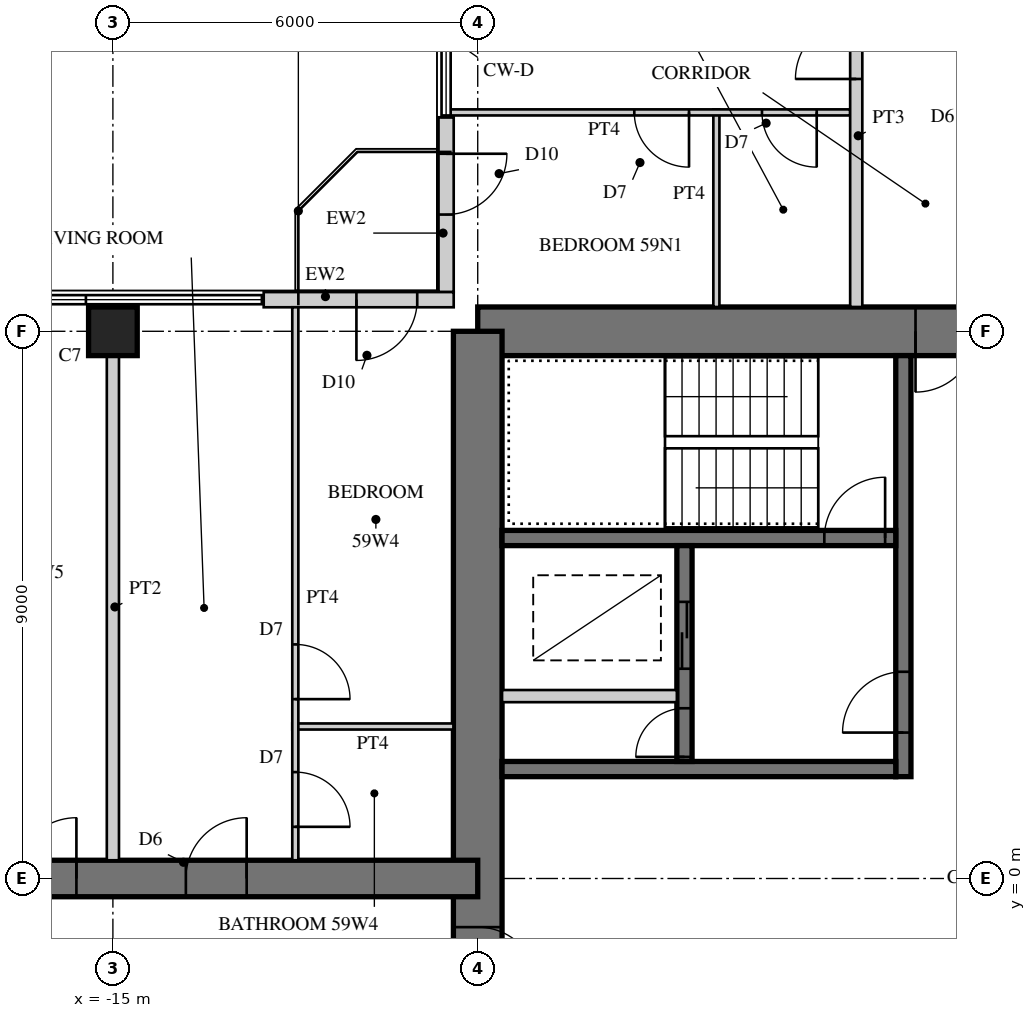
"""IFC4 building model, lengths in metres.
Left out: names, types, materials, properties, quantities, classifications, styles, units other than length and angle.
Written with IfcOpenShell. Run it as: python <this file> out.ifc"""

import sys

from ifc_helpers import new_model, si_unit, direction, frame, frame_2d, origin, origin_2d, place, context, subcontext, project, spatial, rectangle, hollow_rectangle, extrude, element, fill, save


model = new_model("IFC4")
c1 = context("Model", 3, precision=1e-05, world=origin(), true_north=direction((0.0, 1.0)))
c2 = subcontext(c1, "Body", "Model", "MODEL_VIEW")
j1 = project(units=[si_unit("LENGTHUNIT", "METRE"), si_unit("PLANEANGLEUNIT", "RADIAN")], contexts=[c1])
p1 = place(None, origin())
s1 = spatial("IfcSite", under=j1, at=p1, CompositionType="ELEMENT")
p2 = place(p1, origin())
s2 = spatial("IfcBuilding", under=s1, at=p2, CompositionType="ELEMENT")
p3 = place(p2, frame((0.0, 0.0, 232.3)))
s3 = spatial("IfcBuildingStorey", under=s2, at=p3, CompositionType="ELEMENT", Elevation=232.3)
p4 = place(p3, frame((9.0, 9.0, 0.0), z_axis=(0.0, 0.0, 1.0), x_axis=(-1.0, 0.0, 0.0)))
e1 = element("IfcWall", 1, at=p4, inside=s3, PredefinedType="SHEAR", context=c2, shape_type="SweptSolid", body=[
    extrude(rectangle(XDim=18.0, YDim=0.8, at=frame_2d((9.0, 0.0))), origin(), (0.0, 0.0, 1.0), 3.4),
])
p5 = place(p4, frame((9.8, 0.0, 0.0)))
e2 = element("IfcOpeningElement", 2, at=p5, cuts=e1, PredefinedType="OPENING", context=c2, shape_type="SweptSolid", body=[
    extrude(rectangle(XDim=1.0, YDim=2.4, at=frame_2d((0.5, 1.2))), frame((0.0, 0.41, 0.0), z_axis=(0.0, -1.0, 0.0), x_axis=(1.0, 0.0, 0.0)), (0.0, 0.0, 1.0), 0.82),
])
p6 = place(p3, frame((-9.0, 9.0, 0.0), z_axis=(0.0, 0.0, 1.0), x_axis=(0.0, -1.0, 0.0)))
e3 = element("IfcWall", 3, at=p6, inside=s3, PredefinedType="SHEAR", context=c2, shape_type="SweptSolid", body=[
    extrude(rectangle(XDim=18.0, YDim=0.8, at=frame_2d((9.0, 0.0))), origin(), (0.0, 0.0, 1.0), 3.4),
])
p7 = place(p6, frame((9.8, 0.0, 0.0)))
e4 = element("IfcOpeningElement", 4, at=p7, cuts=e3, PredefinedType="OPENING", context=c2, shape_type="SweptSolid", body=[
    extrude(rectangle(XDim=1.0, YDim=2.4, at=frame_2d((0.5, 1.2))), frame((0.0, 0.41, 0.0), z_axis=(0.0, -1.0, 0.0), x_axis=(1.0, 0.0, 0.0)), (0.0, 0.0, 1.0), 0.82),
])
p8 = place(p3, frame((-2.0, 1.675, 0.0), z_axis=(0.0, 0.0, 1.0), x_axis=(0.0, 1.0, 0.0)))
e5 = element("IfcWall", 5, at=p8, inside=s3, PredefinedType="SHEAR", context=c2, shape_type="SweptSolid", body=[
    extrude(rectangle(XDim=6.925, YDim=0.25, at=frame_2d((3.462, 0.0))), origin(), (0.0, 0.0, 1.0), 3.4),
])
p9 = place(p8, frame((0.725, 0.0, 0.0)))
e6 = element("IfcOpeningElement", 6, at=p9, cuts=e5, PredefinedType="OPENING", context=c2, shape_type="SweptSolid", body=[
    extrude(rectangle(XDim=1.0, YDim=2.1, at=frame_2d((0.5, 1.05))), frame((0.0, 0.135, 0.0), z_axis=(0.0, -1.0, 0.0), x_axis=(1.0, 0.0, 0.0)), (0.0, 0.0, 1.0), 0.27),
])
p10 = place(p3, frame((-2.125, 1.8, 0.0), z_axis=(0.0, 0.0, 1.0), x_axis=(-1.0, 0.0, 0.0)))
e7 = element("IfcWall", 7, at=p10, inside=s3, PredefinedType="SHEAR", context=c2, shape_type="SweptSolid", body=[
    extrude(rectangle(XDim=6.475, YDim=0.25, at=frame_2d((3.238, 0.0))), origin(), (0.0, 0.0, 1.0), 3.4),
])
p11 = place(p3, frame((-2.125, 5.6, 0.0), z_axis=(0.0, 0.0, 1.0), x_axis=(-1.0, 0.0, 0.0)))
e8 = element("IfcWall", 8, at=p11, inside=s3, PredefinedType="SHEAR", context=c2, shape_type="SweptSolid", body=[
    extrude(rectangle(XDim=6.475, YDim=0.25, at=frame_2d((3.238, 0.0))), origin(), (0.0, 0.0, 1.0), 3.4),
])
p12 = place(p11, frame((0.175, 0.0, 0.0)))
e9 = element("IfcOpeningElement", 9, at=p12, cuts=e8, PredefinedType="OPENING", context=c2, shape_type="SweptSolid", body=[
    extrude(rectangle(XDim=1.0, YDim=2.1, at=frame_2d((0.5, 1.05))), frame((0.0, 0.135, 0.0), z_axis=(0.0, -1.0, 0.0), x_axis=(1.0, 0.0, 0.0)), (0.0, 0.0, 1.0), 0.27),
])
p13 = place(p3, frame((-5.6, 1.925, 0.0), z_axis=(0.0, 0.0, 1.0), x_axis=(0.0, 1.0, 0.0)))
e10 = element("IfcWall", 10, at=p13, inside=s3, PredefinedType="SHEAR", context=c2, shape_type="SweptSolid", body=[
    extrude(rectangle(XDim=3.55, YDim=0.25, at=frame_2d((1.775, 0.0))), origin(), (0.0, 0.0, 1.0), 3.4),
])
p14 = place(p13, frame((1.525, 0.0, 0.0)))
e11 = element("IfcOpeningElement", 11, at=p14, cuts=e10, PredefinedType="OPENING", context=c2, shape_type="SweptSolid", body=[
    extrude(rectangle(XDim=1.1, YDim=2.2, at=frame_2d((0.55, 1.1))), frame((0.0, 0.135, 0.0), z_axis=(0.0, -1.0, 0.0), x_axis=(1.0, 0.0, 0.0)), (0.0, 0.0, 1.0), 0.27),
])
p15 = place(p13, frame((0.075, 0.0, 0.0)))
e12 = element("IfcOpeningElement", 12, at=p15, cuts=e10, PredefinedType="OPENING", context=c2, shape_type="SweptSolid", body=[
    extrude(rectangle(XDim=0.8, YDim=2.1, at=frame_2d((0.4, 1.05))), frame((0.0, 0.135, 0.0), z_axis=(0.0, -1.0, 0.0), x_axis=(1.0, 0.0, 0.0)), (0.0, 0.0, 1.0), 0.27),
])
p16 = place(p3, frame((-5.725, 3.0, 0.0), z_axis=(0.0, 0.0, 1.0), x_axis=(-1.0, 0.0, 0.0)))
e13 = element("IfcWall", 13, at=p16, inside=s3, PredefinedType="PARTITIONING", context=c2, shape_type="SweptSolid", body=[
    extrude(rectangle(XDim=2.875, YDim=0.2, at=frame_2d((1.438, 0.0))), origin(), (0.0, 0.0, 1.0), 3.4),
])
p17 = place(p3, frame((-9.0, 0.0, 0.0), z_axis=(0.0, 0.0, 1.0), x_axis=(-1.0, 0.0, 0.0)))
e14 = element("IfcWall", 14, at=p17, inside=s3, PredefinedType="SHEAR", context=c2, shape_type="SweptSolid", body=[
    extrude(rectangle(XDim=18.0, YDim=0.6, at=frame_2d((9.0, 0.0))), origin(), (0.0, 0.0, 1.0), 3.4),
])
p18 = place(p17, frame((3.8, 0.0, 0.0)))
e15 = element("IfcOpeningElement", 15, at=p18, cuts=e14, PredefinedType="OPENING", context=c2, shape_type="SweptSolid", body=[
    extrude(rectangle(XDim=1.0, YDim=2.15, at=frame_2d((0.5, 1.075))), frame((0.0, 0.31, 0.0), z_axis=(0.0, -1.0, 0.0), x_axis=(1.0, 0.0, 0.0)), (0.0, 0.0, 1.0), 0.62),
])
p19 = place(p17, frame((6.6, 0.0, 0.0)))
e16 = element("IfcOpeningElement", 16, at=p19, cuts=e14, PredefinedType="OPENING", context=c2, shape_type="SweptSolid", body=[
    extrude(rectangle(XDim=1.0, YDim=2.15, at=frame_2d((0.5, 1.075))), frame((0.0, 0.31, 0.0), z_axis=(0.0, -1.0, 0.0), x_axis=(1.0, 0.0, 0.0)), (0.0, 0.0, 1.0), 0.62),
])
p20 = place(p17, frame((13.3, 0.0, 0.0)))
e17 = element("IfcOpeningElement", 17, at=p20, cuts=e14, PredefinedType="OPENING", context=c2, shape_type="SweptSolid", body=[
    extrude(rectangle(XDim=1.0, YDim=2.2, at=frame_2d((0.5, 1.1))), frame((0.0, 0.31, 0.0), z_axis=(0.0, -1.0, 0.0), x_axis=(1.0, 0.0, 0.0)), (0.0, 0.0, 1.0), 0.62),
])
p21 = place(p3, frame((-15.0, 9.0, 0.0), z_axis=(0.0, 0.0, 1.0), x_axis=(1.0, 0.0, 0.0)))
e18 = element("IfcColumn", 18, at=p21, inside=s3, PredefinedType="COLUMN", context=c2, shape_type="SweptSolid", body=[
    extrude(rectangle(XDim=0.8, YDim=0.8, at=origin_2d()), origin(), (0.0, 0.0, 1.0), 3.4),
])
p22 = place(p3, frame((-9.52, 12.52, 0.0), z_axis=(0.0, 0.0, 1.0), x_axis=(0.0, -1.0, 0.0)))
e19 = element("IfcWall", 19, at=p22, inside=s3, PredefinedType="SOLIDWALL", context=c2, shape_type="SweptSolid", body=[
    extrude(rectangle(XDim=2.875, YDim=0.25, at=frame_2d((1.438, 0.0))), origin(), (0.0, 0.0, 1.0), 3.22),
])
p23 = place(p22, frame((0.6, 0.0, 0.0)))
e20 = element("IfcOpeningElement", 20, at=p23, cuts=e19, PredefinedType="OPENING", context=c2, shape_type="SweptSolid", body=[
    extrude(rectangle(XDim=1.0, YDim=2.2, at=frame_2d((0.5, 1.1))), frame((0.0, 0.135, 0.0), z_axis=(0.0, -1.0, 0.0), x_axis=(1.0, 0.0, 0.0)), (0.0, 0.0, 1.0), 0.27),
])
p24 = place(p3, frame((-9.395, 9.52, 0.0), z_axis=(0.0, 0.0, 1.0), x_axis=(-1.0, 0.0, 0.0)))
e21 = element("IfcWall", 21, at=p24, inside=s3, PredefinedType="SOLIDWALL", context=c2, shape_type="SweptSolid", body=[
    extrude(rectangle(XDim=3.125, YDim=0.25, at=frame_2d((1.562, 0.0))), origin(), (0.0, 0.0, 1.0), 3.22),
])
p25 = place(p24, frame((0.6, 0.0, 0.0)))
e22 = element("IfcOpeningElement", 22, at=p25, cuts=e21, PredefinedType="OPENING", context=c2, shape_type="SweptSolid", body=[
    extrude(rectangle(XDim=1.0, YDim=2.2, at=frame_2d((0.5, 1.1))), frame((0.0, 0.135, 0.0), z_axis=(0.0, -1.0, 0.0), x_axis=(1.0, 0.0, 0.0)), (0.0, 0.0, 1.0), 0.27),
])
p26 = place(p3, frame((-5.075, 9.4, 0.0), z_axis=(0.0, 0.0, 1.0), x_axis=(0.0, 1.0, 0.0)))
e23 = element("IfcWall", 23, at=p26, inside=s3, PredefinedType="PARTITIONING", context=c2, shape_type="SweptSolid", body=[
    extrude(rectangle(XDim=3.25, YDim=0.1, at=frame_2d((1.625, 0.0))), origin(), (0.0, 0.0, 1.0), 3.22),
])
p27 = place(p3, frame((-2.875, 12.6, 0.0), z_axis=(0.0, 0.0, 1.0), x_axis=(-1.0, 0.0, 0.0)))
e24 = element("IfcWall", 24, at=p27, inside=s3, PredefinedType="PARTITIONING", context=c2, shape_type="SweptSolid", body=[
    extrude(rectangle(XDim=6.605, YDim=0.1, at=frame_2d((3.302, 0.0))), origin(), (0.0, 0.0, 1.0), 3.22),
])
p28 = place(p27, frame((0.55, 0.0, 0.0)))
e25 = element("IfcOpeningElement", 25, at=p28, cuts=e24, PredefinedType="OPENING", context=c2, shape_type="SweptSolid", body=[
    extrude(rectangle(XDim=0.9, YDim=2.1, at=frame_2d((0.45, 1.05))), frame((0.0, 0.06, 0.0), z_axis=(0.0, -1.0, 0.0), x_axis=(1.0, 0.0, 0.0)), (0.0, 0.0, 1.0), 0.12),
])
p29 = place(p27, frame((2.65, 0.0, 0.0)))
e26 = element("IfcOpeningElement", 26, at=p29, cuts=e24, PredefinedType="OPENING", context=c2, shape_type="SweptSolid", body=[
    extrude(rectangle(XDim=0.9, YDim=2.1, at=frame_2d((0.45, 1.05))), frame((0.0, 0.06, 0.0), z_axis=(0.0, -1.0, 0.0), x_axis=(1.0, 0.0, 0.0)), (0.0, 0.0, 1.0), 0.12),
])
p30 = place(p3, frame((-2.775, 9.4, 0.0), z_axis=(0.0, 0.0, 1.0), x_axis=(0.0, 1.0, 0.0)))
e27 = element("IfcWall", 27, at=p30, inside=s3, PredefinedType="SOLIDWALL", context=c2, shape_type="SweptSolid", body=[
    extrude(rectangle(XDim=5.6, YDim=0.2, at=frame_2d((2.8, 0.0))), origin(), (0.0, 0.0, 1.0), 3.22),
])
p31 = place(p30, frame((3.75, 0.0, 0.0)))
e28 = element("IfcOpeningElement", 28, at=p31, cuts=e27, PredefinedType="OPENING", context=c2, shape_type="SweptSolid", body=[
    extrude(rectangle(XDim=1.0, YDim=2.15, at=frame_2d((0.5, 1.075))), frame((0.0, 0.11, 0.0), z_axis=(0.0, -1.0, 0.0), x_axis=(1.0, 0.0, 0.0)), (0.0, 0.0, 1.0), 0.22),
])
p32 = place(p3, frame((-9.4, 2.5, 0.0), z_axis=(0.0, 0.0, 1.0), x_axis=(-1.0, 0.0, 0.0)))
e29 = element("IfcWall", 29, at=p32, inside=s3, PredefinedType="PARTITIONING", context=c2, shape_type="SweptSolid", body=[
    extrude(rectangle(XDim=2.65, YDim=0.1, at=frame_2d((1.325, 0.0))), origin(), (0.0, 0.0, 1.0), 3.22),
])
p33 = place(p3, frame((-12.0, 9.395, 0.0), z_axis=(0.0, 0.0, 1.0), x_axis=(0.0, -1.0, 0.0)))
e30 = element("IfcWall", 30, at=p33, inside=s3, PredefinedType="PARTITIONING", context=c2, shape_type="SweptSolid", body=[
    extrude(rectangle(XDim=9.095, YDim=0.1, at=frame_2d((4.547, 0.0))), origin(), (0.0, 0.0, 1.0), 3.22),
])
p34 = place(p33, frame((5.545, 0.0, 0.0)))
e31 = element("IfcOpeningElement", 31, at=p34, cuts=e30, PredefinedType="OPENING", context=c2, shape_type="SweptSolid", body=[
    extrude(rectangle(XDim=0.9, YDim=2.1, at=frame_2d((0.45, 1.05))), frame((0.0, 0.06, 0.0), z_axis=(0.0, -1.0, 0.0), x_axis=(1.0, 0.0, 0.0)), (0.0, 0.0, 1.0), 0.12),
])
p35 = place(p33, frame((7.645, 0.0, 0.0)))
e32 = element("IfcOpeningElement", 32, at=p35, cuts=e30, PredefinedType="OPENING", context=c2, shape_type="SweptSolid", body=[
    extrude(rectangle(XDim=0.9, YDim=2.1, at=frame_2d((0.45, 1.05))), frame((0.0, 0.06, 0.0), z_axis=(0.0, -1.0, 0.0), x_axis=(1.0, 0.0, 0.0)), (0.0, 0.0, 1.0), 0.12),
])
p36 = place(p3, frame((-15.0, 8.6, 0.0), z_axis=(0.0, 0.0, 1.0), x_axis=(0.0, -1.0, 0.0)))
e33 = element("IfcWall", 33, at=p36, inside=s3, PredefinedType="SOLIDWALL", context=c2, shape_type="SweptSolid", body=[
    extrude(rectangle(XDim=8.3, YDim=0.2, at=frame_2d((4.15, 0.0))), origin(), (0.0, 0.0, 1.0), 2.52),
])
p37 = place(p23, origin())
e34 = element("IfcDoor", 34, at=p37, inside=s3, OperationType="SINGLE_SWING_LEFT", PredefinedType="DOOR", context=c2, shape_type="SweptSolid", body=[
    extrude(hollow_rectangle(XDim=1.0, YDim=2.2, WallThickness=0.06, at=frame_2d((0.5, 1.1))), frame((0.0, 0.025, 0.0), z_axis=(0.0, -1.0, 0.0), x_axis=(1.0, 0.0, 0.0)), (0.0, 0.0, 1.0), 0.05),
    extrude(rectangle(XDim=0.879, YDim=2.079, at=frame_2d((0.5, 1.1))), frame((0.0, 0.025, 0.0), z_axis=(0.0, -1.0, 0.0), x_axis=(1.0, 0.0, 0.0)), (0.0, 0.0, 1.0), 0.05),
])
fill(e20, e34)
p38 = place(p25, origin())
e35 = element("IfcDoor", 35, at=p38, inside=s3, OperationType="SINGLE_SWING_RIGHT", PredefinedType="DOOR", context=c2, shape_type="SweptSolid", body=[
    extrude(hollow_rectangle(XDim=1.0, YDim=2.2, WallThickness=0.06, at=frame_2d((0.5, 1.1))), frame((0.0, 0.025, 0.0), z_axis=(0.0, -1.0, 0.0), x_axis=(1.0, 0.0, 0.0)), (0.0, 0.0, 1.0), 0.05),
    extrude(rectangle(XDim=0.879, YDim=2.079, at=frame_2d((0.5, 1.1))), frame((0.0, 0.025, 0.0), z_axis=(0.0, -1.0, 0.0), x_axis=(1.0, 0.0, 0.0)), (0.0, 0.0, 1.0), 0.05),
])
fill(e22, e35)
p39 = place(p28, origin())
e36 = element("IfcDoor", 36, at=p39, inside=s3, OperationType="SINGLE_SWING_LEFT", PredefinedType="DOOR", context=c2, shape_type="SweptSolid", body=[
    extrude(rectangle(XDim=0.9, YDim=2.1, at=frame_2d((0.45, 1.05))), frame((0.0, 0.025, 0.0), z_axis=(0.0, -1.0, 0.0), x_axis=(1.0, 0.0, 0.0)), (0.0, 0.0, 1.0), 0.05),
])
fill(e25, e36)
p40 = place(p29, origin())
e37 = element("IfcDoor", 37, at=p40, inside=s3, OperationType="SINGLE_SWING_LEFT", PredefinedType="DOOR", context=c2, shape_type="SweptSolid", body=[
    extrude(rectangle(XDim=0.9, YDim=2.1, at=frame_2d((0.45, 1.05))), frame((0.0, 0.025, 0.0), z_axis=(0.0, -1.0, 0.0), x_axis=(1.0, 0.0, 0.0)), (0.0, 0.0, 1.0), 0.05),
])
fill(e26, e37)
p41 = place(p31, origin())
e38 = element("IfcDoor", 38, at=p41, inside=s3, OperationType="SINGLE_SWING_LEFT", PredefinedType="DOOR", context=c2, shape_type="SweptSolid", body=[
    extrude(rectangle(XDim=1.0, YDim=2.15, at=frame_2d((0.5, 1.075))), frame((0.0, 0.025, 0.0), z_axis=(0.0, -1.0, 0.0), x_axis=(1.0, 0.0, 0.0)), (0.0, 0.0, 1.0), 0.05),
])
fill(e28, e38)
p42 = place(p34, origin())
e39 = element("IfcDoor", 39, at=p42, inside=s3, OperationType="SINGLE_SWING_RIGHT", PredefinedType="DOOR", context=c2, shape_type="SweptSolid", body=[
    extrude(rectangle(XDim=0.9, YDim=2.1, at=frame_2d((0.45, 1.05))), frame((0.0, 0.025, 0.0), z_axis=(0.0, -1.0, 0.0), x_axis=(1.0, 0.0, 0.0)), (0.0, 0.0, 1.0), 0.05),
])
fill(e31, e39)
p43 = place(p35, origin())
e40 = element("IfcDoor", 40, at=p43, inside=s3, OperationType="SINGLE_SWING_RIGHT", PredefinedType="DOOR", context=c2, shape_type="SweptSolid", body=[
    extrude(rectangle(XDim=0.9, YDim=2.1, at=frame_2d((0.45, 1.05))), frame((0.0, 0.025, 0.0), z_axis=(0.0, -1.0, 0.0), x_axis=(1.0, 0.0, 0.0)), (0.0, 0.0, 1.0), 0.05),
])
fill(e32, e40)
p44 = place(p18, frame((1.0, 0.0, 0.0), z_axis=(0.0, 0.0, 1.0), x_axis=(-1.0, 0.0, 0.0)))
e41 = element("IfcDoor", 41, at=p44, inside=s3, OperationType="SINGLE_SWING_RIGHT", PredefinedType="DOOR", context=c2, shape_type="SweptSolid", body=[
    extrude(rectangle(XDim=1.0, YDim=2.15, at=frame_2d((0.5, 1.075))), frame((0.0, 0.025, 0.0), z_axis=(0.0, -1.0, 0.0), x_axis=(1.0, 0.0, 0.0)), (0.0, 0.0, 1.0), 0.05),
])
fill(e15, e41)
p45 = place(p19, frame((1.0, 0.0, 0.0), z_axis=(0.0, 0.0, 1.0), x_axis=(-1.0, 0.0, 0.0)))
e42 = element("IfcDoor", 42, at=p45, inside=s3, OperationType="SINGLE_SWING_RIGHT", PredefinedType="DOOR", context=c2, shape_type="SweptSolid", body=[
    extrude(rectangle(XDim=1.0, YDim=2.15, at=frame_2d((0.5, 1.075))), frame((0.0, 0.025, 0.0), z_axis=(0.0, -1.0, 0.0), x_axis=(1.0, 0.0, 0.0)), (0.0, 0.0, 1.0), 0.05),
])
fill(e16, e42)
p46 = place(p5, origin())
e43 = element("IfcDoor", 43, at=p46, inside=s3, OperationType="SINGLE_SWING_RIGHT", PredefinedType="DOOR", context=c2, shape_type="SweptSolid", body=[
    extrude(rectangle(XDim=1.0, YDim=2.4, at=frame_2d((0.5, 1.2))), frame((0.0, 0.055, 0.0), z_axis=(0.0, -1.0, 0.0), x_axis=(1.0, 0.0, 0.0)), (0.0, 0.0, 1.0), 0.05),
])
fill(e2, e43)
p47 = place(p7, origin())
e44 = element("IfcDoor", 44, at=p47, inside=s3, OperationType="SINGLE_SWING_RIGHT", PredefinedType="DOOR", context=c2, shape_type="SweptSolid", body=[
    extrude(rectangle(XDim=1.0, YDim=2.4, at=frame_2d((0.5, 1.2))), frame((0.0, 0.055, 0.0), z_axis=(0.0, -1.0, 0.0), x_axis=(1.0, 0.0, 0.0)), (0.0, 0.0, 1.0), 0.05),
])
fill(e4, e44)
p48 = place(p9, origin())
e45 = element("IfcDoor", 45, at=p48, inside=s3, OperationType="SINGLE_SWING_LEFT", PredefinedType="DOOR", context=c2, shape_type="SweptSolid", body=[
    extrude(rectangle(XDim=1.0, YDim=2.1, at=frame_2d((0.5, 1.05))), frame((0.0, 0.025, 0.0), z_axis=(0.0, -1.0, 0.0), x_axis=(1.0, 0.0, 0.0)), (0.0, 0.0, 1.0), 0.05),
])
fill(e6, e45)
p49 = place(p12, frame((1.0, 0.0, 0.0), z_axis=(0.0, 0.0, 1.0), x_axis=(-1.0, 0.0, 0.0)))
e46 = element("IfcDoor", 46, at=p49, inside=s3, OperationType="SINGLE_SWING_RIGHT", PredefinedType="DOOR", context=c2, shape_type="SweptSolid", body=[
    extrude(rectangle(XDim=1.0, YDim=2.1, at=frame_2d((0.5, 1.05))), frame((0.0, 0.025, 0.0), z_axis=(0.0, -1.0, 0.0), x_axis=(1.0, 0.0, 0.0)), (0.0, 0.0, 1.0), 0.05),
])
fill(e9, e46)
p50 = place(p14, origin())
e47 = element("IfcDoor", 47, at=p50, inside=s3, OperationType="DOUBLE_DOOR_SLIDING", PredefinedType="DOOR", context=c2, shape_type="SweptSolid", body=[
    extrude(rectangle(XDim=1.1, YDim=2.2, at=frame_2d((0.55, 1.1))), frame((0.0, 0.025, 0.0), z_axis=(0.0, -1.0, 0.0), x_axis=(1.0, 0.0, 0.0)), (0.0, 0.0, 1.0), 0.05),
])
fill(e11, e47)
p51 = place(p15, origin())
e48 = element("IfcDoor", 48, at=p51, inside=s3, OperationType="SINGLE_SWING_LEFT", PredefinedType="DOOR", context=c2, shape_type="SweptSolid", body=[
    extrude(rectangle(XDim=0.8, YDim=2.1, at=frame_2d((0.4, 1.05))), frame((0.0, 0.025, 0.0), z_axis=(0.0, -1.0, 0.0), x_axis=(1.0, 0.0, 0.0)), (0.0, 0.0, 1.0), 0.05),
])
fill(e12, e48)
save(model, sys.argv[1])
